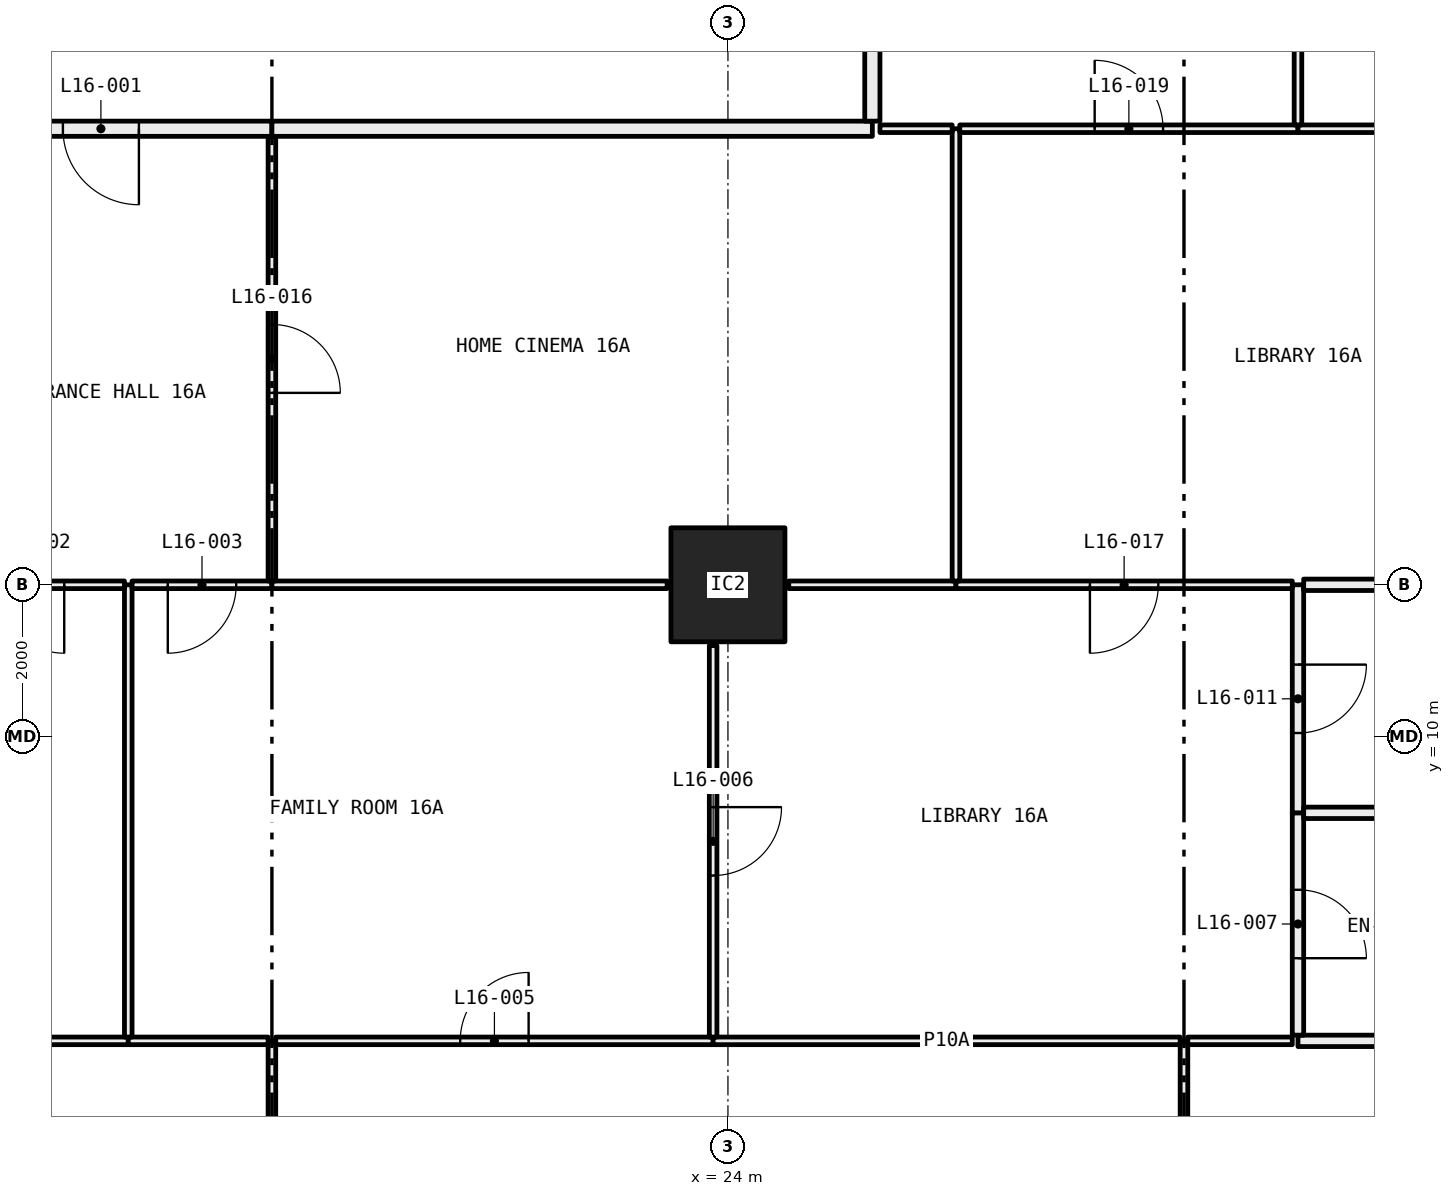
"""IFC4 building model, lengths in metres.
Left out: names, types, materials, properties, quantities, classifications, styles, units other than length and angle.
Written with IfcOpenShell. Run it as: python <this file> out.ifc"""

import sys

from ifc_helpers import new_model, si_unit, direction, frame, frame_2d, origin, origin_2d, place, context, subcontext, project, spatial, rectangle, hollow_rectangle, extrude, element, fill, save


model = new_model("IFC4")
c1 = context("Model", 3, precision=1e-05, world=origin(), true_north=direction((0.0, 1.0)))
c2 = subcontext(c1, "Body", "Model", "MODEL_VIEW")
j1 = project(units=[si_unit("LENGTHUNIT", "METRE"), si_unit("PLANEANGLEUNIT", "RADIAN")], contexts=[c1])
p1 = place(None, origin())
s1 = spatial("IfcSite", under=j1, at=p1, CompositionType="ELEMENT")
p2 = place(p1, origin())
s2 = spatial("IfcBuilding", under=s1, at=p2, CompositionType="ELEMENT")
p3 = place(p2, frame((0.0, 0.0, 67.95)))
s3 = spatial("IfcBuildingStorey", under=s2, at=p3, CompositionType="ELEMENT", Elevation=67.95)
p4 = place(p3, frame((24.0, 12.0, 0.0), z_axis=(0.0, 0.0, 1.0), x_axis=(1.0, 0.0, 0.0)))
e1 = element("IfcColumn", 1, at=p4, inside=s3, PredefinedType="COLUMN", context=c2, shape_type="SweptSolid", body=[
    extrude(hollow_rectangle(XDim=1.5, YDim=1.5, WallThickness=0.065, at=origin_2d()), origin(), (0.0, 0.0, 1.0), 3.05),
])
p5 = place(p3, frame((18.0, 0.72, 0.0), z_axis=(0.0, 0.0, 1.0), x_axis=(0.0, 1.0, 0.0)))
e2 = element("IfcWall", 2, at=p5, inside=s3, PredefinedType="PARTITIONING", context=c2, shape_type="SweptSolid", body=[
    extrude(rectangle(XDim=5.28, YDim=0.1, at=frame_2d((2.64, 0.0))), origin(), (0.0, 0.0, 1.0), 3.05),
])
p6 = place(p5, frame((2.19, 0.0, 0.0)))
e3 = element("IfcOpeningElement", 3, at=p6, cuts=e2, PredefinedType="OPENING", context=c2, shape_type="SweptSolid", body=[
    extrude(rectangle(XDim=0.9, YDim=2.1, at=frame_2d((0.45, 1.05))), frame((0.0, 0.06, 0.0), z_axis=(0.0, -1.0, 0.0), x_axis=(1.0, 0.0, 0.0)), (0.0, 0.0, 1.0), 0.12),
])
p7 = place(p3, frame((16.11, 6.0, 0.0), z_axis=(0.0, 0.0, 1.0), x_axis=(-1.0, 0.0, 0.0)))
e4 = element("IfcWall", 4, at=p7, inside=s3, PredefinedType="PARTITIONING", context=c2, shape_type="SweptSolid", body=[
    extrude(rectangle(XDim=4.06, YDim=0.1, at=frame_2d((2.03, 0.0))), origin(), (0.0, 0.0, 1.0), 2.45),
])
p8 = place(p3, frame((17.95, 6.0, 0.0), z_axis=(0.0, 0.0, 1.0), x_axis=(-1.0, 0.0, 0.0)))
e5 = element("IfcWall", 5, at=p8, inside=s3, PredefinedType="PARTITIONING", context=c2, shape_type="SweptSolid", body=[
    extrude(rectangle(XDim=1.84, YDim=0.1, at=frame_2d((0.92, 0.0))), origin(), (0.0, 0.0, 1.0), 3.05),
])
p9 = place(p3, frame((30.0, 0.72, 0.0), z_axis=(0.0, 0.0, 1.0), x_axis=(0.0, 1.0, 0.0)))
e6 = element("IfcWall", 6, at=p9, inside=s3, PredefinedType="PARTITIONING", context=c2, shape_type="SweptSolid", body=[
    extrude(rectangle(XDim=5.28, YDim=0.1, at=frame_2d((2.64, 0.0))), origin(), (0.0, 0.0, 1.0), 3.05),
])
p10 = place(p9, frame((2.19, 0.0, 0.0)))
e7 = element("IfcOpeningElement", 7, at=p10, cuts=e6, PredefinedType="OPENING", context=c2, shape_type="SweptSolid", body=[
    extrude(rectangle(XDim=0.9, YDim=2.1, at=frame_2d((0.45, 1.05))), frame((0.0, 0.06, 0.0), z_axis=(0.0, -1.0, 0.0), x_axis=(1.0, 0.0, 0.0)), (0.0, 0.0, 1.0), 0.12),
])
p11 = place(p3, frame((23.805, 6.0, 0.0), z_axis=(0.0, 0.0, 1.0), x_axis=(-1.0, 0.0, 0.0)))
e8 = element("IfcWall", 8, at=p11, inside=s3, PredefinedType="PARTITIONING", context=c2, shape_type="SweptSolid", body=[
    extrude(rectangle(XDim=5.755, YDim=0.1, at=frame_2d((2.877, 0.0))), origin(), (0.0, 0.0, 1.0), 3.05),
])
p12 = place(p11, frame((2.427, 0.0, 0.0)))
e9 = element("IfcOpeningElement", 9, at=p12, cuts=e8, PredefinedType="OPENING", context=c2, shape_type="SweptSolid", body=[
    extrude(rectangle(XDim=0.9, YDim=2.1, at=frame_2d((0.45, 1.05))), frame((0.0, 0.06, 0.0), z_axis=(0.0, -1.0, 0.0), x_axis=(1.0, 0.0, 0.0)), (0.0, 0.0, 1.0), 0.12),
])
p13 = place(p3, frame((29.95, 6.0, 0.0), z_axis=(0.0, 0.0, 1.0), x_axis=(-1.0, 0.0, 0.0)))
e10 = element("IfcWall", 10, at=p13, inside=s3, PredefinedType="PARTITIONING", context=c2, shape_type="SweptSolid", body=[
    extrude(rectangle(XDim=6.145, YDim=0.1, at=frame_2d((3.073, 0.0))), origin(), (0.0, 0.0, 1.0), 2.45),
])
p14 = place(p3, frame((31.425, 6.0, 0.0), z_axis=(0.0, 0.0, 1.0), x_axis=(-1.0, 0.0, 0.0)))
e11 = element("IfcWall", 11, at=p14, inside=s3, PredefinedType="PARTITIONING", context=c2, shape_type="SweptSolid", body=[
    extrude(rectangle(XDim=1.375, YDim=0.1, at=frame_2d((0.688, 0.0))), origin(), (0.0, 0.0, 1.0), 3.05),
])
p15 = place(p3, frame((35.9, 6.0, 0.0), z_axis=(0.0, 0.0, 1.0), x_axis=(-1.0, 0.0, 0.0)))
e12 = element("IfcWall", 12, at=p15, inside=s3, PredefinedType="PARTITIONING", context=c2, shape_type="SweptSolid", body=[
    extrude(rectangle(XDim=4.4, YDim=0.15, at=frame_2d((2.2, 0.0))), origin(), (0.0, 0.0, 1.0), 3.05),
])
p16 = place(p3, frame((16.11, 6.05, 0.0), z_axis=(0.0, 0.0, 1.0), x_axis=(0.0, 1.0, 0.0)))
e13 = element("IfcWall", 13, at=p16, inside=s3, PredefinedType="PARTITIONING", context=c2, shape_type="SweptSolid", body=[
    extrude(rectangle(XDim=5.95, YDim=0.1, at=frame_2d((2.975, 0.0))), origin(), (0.0, 0.0, 1.0), 2.45),
])
p17 = place(p3, frame((16.06, 12.0, 0.0), z_axis=(0.0, 0.0, 1.0), x_axis=(-1.0, 0.0, 0.0)))
e14 = element("IfcWall", 14, at=p17, inside=s3, PredefinedType="PARTITIONING", context=c2, shape_type="SweptSolid", body=[
    extrude(rectangle(XDim=2.485, YDim=0.1, at=frame_2d((1.243, 0.0))), origin(), (0.0, 0.0, 1.0), 2.45),
])
p18 = place(p17, frame((0.792, 0.0, 0.0)))
e15 = element("IfcOpeningElement", 15, at=p18, cuts=e14, PredefinedType="OPENING", context=c2, shape_type="SweptSolid", body=[
    extrude(rectangle(XDim=0.9, YDim=2.1, at=frame_2d((0.45, 1.05))), frame((0.0, 0.06, 0.0), z_axis=(0.0, -1.0, 0.0), x_axis=(1.0, 0.0, 0.0)), (0.0, 0.0, 1.0), 0.12),
])
p19 = place(p3, frame((23.805, 6.05, 0.0), z_axis=(0.0, 0.0, 1.0), x_axis=(0.0, 1.0, 0.0)))
e16 = element("IfcWall", 16, at=p19, inside=s3, PredefinedType="PARTITIONING", context=c2, shape_type="SweptSolid", body=[
    extrude(rectangle(XDim=5.15, YDim=0.1, at=frame_2d((2.575, 0.0))), origin(), (0.0, 0.0, 1.0), 3.05),
])
p20 = place(p19, frame((2.125, 0.0, 0.0)))
e17 = element("IfcOpeningElement", 17, at=p20, cuts=e16, PredefinedType="OPENING", context=c2, shape_type="SweptSolid", body=[
    extrude(rectangle(XDim=0.9, YDim=2.1, at=frame_2d((0.45, 1.05))), frame((0.0, 0.06, 0.0), z_axis=(0.0, -1.0, 0.0), x_axis=(1.0, 0.0, 0.0)), (0.0, 0.0, 1.0), 0.12),
])
p21 = place(p3, frame((18.0, 12.0, 0.0), z_axis=(0.0, 0.0, 1.0), x_axis=(-1.0, 0.0, 0.0)))
e18 = element("IfcWall", 18, at=p21, inside=s3, PredefinedType="PARTITIONING", context=c2, shape_type="SweptSolid", body=[
    extrude(rectangle(XDim=1.84, YDim=0.1, at=frame_2d((0.92, 0.0))), origin(), (0.0, 0.0, 1.0), 2.45),
])
p22 = place(p21, frame((0.47, 0.0, 0.0)))
e19 = element("IfcOpeningElement", 19, at=p22, cuts=e18, PredefinedType="OPENING", context=c2, shape_type="SweptSolid", body=[
    extrude(rectangle(XDim=0.9, YDim=2.1, at=frame_2d((0.45, 1.05))), frame((0.0, 0.06, 0.0), z_axis=(0.0, -1.0, 0.0), x_axis=(1.0, 0.0, 0.0)), (0.0, 0.0, 1.0), 0.12),
])
p23 = place(p3, frame((23.2, 12.0, 0.0), z_axis=(0.0, 0.0, 1.0), x_axis=(-1.0, 0.0, 0.0)))
e20 = element("IfcWall", 20, at=p23, inside=s3, PredefinedType="PARTITIONING", context=c2, shape_type="SweptSolid", body=[
    extrude(rectangle(XDim=5.2, YDim=0.1, at=frame_2d((2.6, 0.0))), origin(), (0.0, 0.0, 1.0), 2.45),
])
p24 = place(p3, frame((31.5, 6.075, 0.0), z_axis=(0.0, 0.0, 1.0), x_axis=(0.0, 1.0, 0.0)))
e21 = element("IfcWall", 21, at=p24, inside=s3, PredefinedType="PARTITIONING", context=c2, shape_type="SweptSolid", body=[
    extrude(rectangle(XDim=2.925, YDim=0.15, at=frame_2d((1.462, 0.0))), origin(), (0.0, 0.0, 1.0), 3.05),
])
p25 = place(p24, frame((1.012, 0.0, 0.0)))
e22 = element("IfcOpeningElement", 22, at=p25, cuts=e21, PredefinedType="OPENING", context=c2, shape_type="SweptSolid", body=[
    extrude(rectangle(XDim=0.9, YDim=2.1, at=frame_2d((0.45, 1.05))), frame((0.0, 0.085, 0.0), z_axis=(0.0, -1.0, 0.0), x_axis=(1.0, 0.0, 0.0)), (0.0, 0.0, 1.0), 0.17),
])
p26 = place(p3, frame((31.5, 9.0, 0.0), z_axis=(0.0, 0.0, 1.0), x_axis=(0.0, 1.0, 0.0)))
e23 = element("IfcWall", 23, at=p26, inside=s3, PredefinedType="PARTITIONING", context=c2, shape_type="SweptSolid", body=[
    extrude(rectangle(XDim=3.0, YDim=0.15, at=frame_2d((1.5, 0.0))), origin(), (0.0, 0.0, 1.0), 2.45),
])
p27 = place(p26, frame((1.05, 0.0, 0.0)))
e24 = element("IfcOpeningElement", 24, at=p27, cuts=e23, PredefinedType="OPENING", context=c2, shape_type="SweptSolid", body=[
    extrude(rectangle(XDim=0.9, YDim=2.1, at=frame_2d((0.45, 1.05))), frame((0.0, 0.085, 0.0), z_axis=(0.0, -1.0, 0.0), x_axis=(1.0, 0.0, 0.0)), (0.0, 0.0, 1.0), 0.17),
])
p28 = place(p3, frame((27.0, 12.0, 0.0), z_axis=(0.0, 0.0, 1.0), x_axis=(-1.0, 0.0, 0.0)))
e25 = element("IfcWall", 25, at=p28, inside=s3, PredefinedType="PARTITIONING", context=c2, shape_type="SweptSolid", body=[
    extrude(rectangle(XDim=2.2, YDim=0.1, at=frame_2d((1.1, 0.0))), origin(), (0.0, 0.0, 1.0), 2.45),
])
p29 = place(p3, frame((31.425, 12.0, 0.0), z_axis=(0.0, 0.0, 1.0), x_axis=(-1.0, 0.0, 0.0)))
e26 = element("IfcWall", 26, at=p29, inside=s3, PredefinedType="PARTITIONING", context=c2, shape_type="SweptSolid", body=[
    extrude(rectangle(XDim=4.425, YDim=0.1, at=frame_2d((2.212, 0.0))), origin(), (0.0, 0.0, 1.0), 2.45),
])
p30 = place(p29, frame((1.762, 0.0, 0.0)))
e27 = element("IfcOpeningElement", 27, at=p30, cuts=e26, PredefinedType="OPENING", context=c2, shape_type="SweptSolid", body=[
    extrude(rectangle(XDim=0.9, YDim=2.1, at=frame_2d((0.45, 1.05))), frame((0.0, 0.06, 0.0), z_axis=(0.0, -1.0, 0.0), x_axis=(1.0, 0.0, 0.0)), (0.0, 0.0, 1.0), 0.12),
])
p31 = place(p3, frame((35.9, 9.0, 0.0), z_axis=(0.0, 0.0, 1.0), x_axis=(-1.0, 0.0, 0.0)))
e28 = element("IfcWall", 28, at=p31, inside=s3, PredefinedType="PARTITIONING", context=c2, shape_type="SweptSolid", body=[
    extrude(rectangle(XDim=4.325, YDim=0.15, at=frame_2d((2.163, 0.0))), origin(), (0.0, 0.0, 1.0), 3.05),
])
p32 = place(p3, frame((35.2, 12.0, 0.0), z_axis=(0.0, 0.0, 1.0), x_axis=(-1.0, 0.0, 0.0)))
e29 = element("IfcWall", 29, at=p32, inside=s3, PredefinedType="PARTITIONING", context=c2, shape_type="SweptSolid", body=[
    extrude(rectangle(XDim=3.625, YDim=0.15, at=frame_2d((1.812, 0.0))), origin(), (0.0, 0.0, 1.0), 2.45),
])
p33 = place(p3, frame((18.0, 12.05, 0.0), z_axis=(0.0, 0.0, 1.0), x_axis=(0.0, 1.0, 0.0)))
e30 = element("IfcWall", 30, at=p33, inside=s3, PredefinedType="PARTITIONING", context=c2, shape_type="SweptSolid", body=[
    extrude(rectangle(XDim=5.85, YDim=0.1, at=frame_2d((2.925, 0.0))), origin(), (0.0, 0.0, 1.0), 2.45),
])
p34 = place(p33, frame((2.475, 0.0, 0.0)))
e31 = element("IfcOpeningElement", 31, at=p34, cuts=e30, PredefinedType="OPENING", context=c2, shape_type="SweptSolid", body=[
    extrude(rectangle(XDim=0.9, YDim=2.1, at=frame_2d((0.45, 1.05))), frame((0.0, 0.06, 0.0), z_axis=(0.0, -1.0, 0.0), x_axis=(1.0, 0.0, 0.0)), (0.0, 0.0, 1.0), 0.12),
])
p35 = place(p3, frame((18.0, 18.0, 0.0), z_axis=(0.0, 0.0, 1.0), x_axis=(-1.0, 0.0, 0.0)))
e32 = element("IfcWall", 32, at=p35, inside=s3, PredefinedType="PARTITIONING", context=c2, shape_type="SweptSolid", body=[
    extrude(rectangle(XDim=4.5, YDim=0.2, at=frame_2d((2.25, 0.0))), origin(), (0.0, 0.0, 1.0), 3.05),
])
p36 = place(p35, frame((1.75, 0.0, 0.0)))
e33 = element("IfcOpeningElement", 33, at=p36, cuts=e32, PredefinedType="OPENING", context=c2, shape_type="SweptSolid", body=[
    extrude(rectangle(XDim=1.0, YDim=2.1, at=frame_2d((0.5, 1.05))), frame((0.0, 0.11, 0.0), z_axis=(0.0, -1.0, 0.0), x_axis=(1.0, 0.0, 0.0)), (0.0, 0.0, 1.0), 0.22),
])
p37 = place(p3, frame((27.0, 12.05, 0.0), z_axis=(0.0, 0.0, 1.0), x_axis=(0.0, 1.0, 0.0)))
e34 = element("IfcWall", 34, at=p37, inside=s3, PredefinedType="PARTITIONING", context=c2, shape_type="SweptSolid", body=[
    extrude(rectangle(XDim=5.95, YDim=0.1, at=frame_2d((2.975, 0.0))), origin(), (0.0, 0.0, 1.0), 2.45),
])
p38 = place(p3, frame((26.95, 18.0, 0.0), z_axis=(0.0, 0.0, 1.0), x_axis=(-1.0, 0.0, 0.0)))
e35 = element("IfcWall", 35, at=p38, inside=s3, PredefinedType="PARTITIONING", context=c2, shape_type="SweptSolid", body=[
    extrude(rectangle(XDim=0.95, YDim=0.1, at=frame_2d((0.475, 0.0))), origin(), (0.0, 0.0, 1.0), 3.05),
])
p39 = place(p3, frame((25.9, 18.0, 0.0), z_axis=(0.0, 0.0, 1.0), x_axis=(-1.0, 0.0, 0.0)))
e36 = element("IfcWall", 36, at=p39, inside=s3, PredefinedType="PARTITIONING", context=c2, shape_type="SweptSolid", body=[
    extrude(rectangle(XDim=7.9, YDim=0.2, at=frame_2d((3.95, 0.0))), origin(), (0.0, 0.0, 1.0), 3.05),
])
p40 = place(p3, frame((31.5, 18.0, 0.0), z_axis=(0.0, 0.0, 1.0), x_axis=(-1.0, 0.0, 0.0)))
e37 = element("IfcWall", 37, at=p40, inside=s3, PredefinedType="PARTITIONING", context=c2, shape_type="SweptSolid", body=[
    extrude(rectangle(XDim=4.45, YDim=0.1, at=frame_2d((2.225, 0.0))), origin(), (0.0, 0.0, 1.0), 3.05),
])
p41 = place(p40, frame((1.775, 0.0, 0.0)))
e38 = element("IfcOpeningElement", 38, at=p41, cuts=e37, PredefinedType="OPENING", context=c2, shape_type="SweptSolid", body=[
    extrude(rectangle(XDim=0.9, YDim=2.1, at=frame_2d((0.45, 1.05))), frame((0.0, 0.06, 0.0), z_axis=(0.0, -1.0, 0.0), x_axis=(1.0, 0.0, 0.0)), (0.0, 0.0, 1.0), 0.12),
])
p42 = place(p3, frame((35.9, 18.0, 0.0), z_axis=(0.0, 0.0, 1.0), x_axis=(-1.0, 0.0, 0.0)))
e39 = element("IfcWall", 39, at=p42, inside=s3, PredefinedType="PARTITIONING", context=c2, shape_type="SweptSolid", body=[
    extrude(rectangle(XDim=4.4, YDim=0.1, at=frame_2d((2.2, 0.0))), origin(), (0.0, 0.0, 1.0), 3.05),
])
p43 = place(p3, frame((31.5, 18.05, 0.0), z_axis=(0.0, 0.0, 1.0), x_axis=(0.0, 1.0, 0.0)))
e40 = element("IfcWall", 40, at=p43, inside=s3, PredefinedType="PARTITIONING", context=c2, shape_type="SweptSolid", body=[
    extrude(rectangle(XDim=6.25, YDim=0.1, at=frame_2d((3.125, 0.0))), origin(), (0.0, 0.0, 1.0), 2.45),
])
p44 = place(p43, frame((2.675, 0.0, 0.0)))
e41 = element("IfcOpeningElement", 41, at=p44, cuts=e40, PredefinedType="OPENING", context=c2, shape_type="SweptSolid", body=[
    extrude(rectangle(XDim=0.9, YDim=2.1, at=frame_2d((0.45, 1.05))), frame((0.0, 0.06, 0.0), z_axis=(0.0, -1.0, 0.0), x_axis=(1.0, 0.0, 0.0)), (0.0, 0.0, 1.0), 0.12),
])
p45 = place(p3, frame((25.9, 23.9, 0.0), z_axis=(0.0, 0.0, 1.0), x_axis=(0.0, -1.0, 0.0)))
e42 = element("IfcWall", 42, at=p45, inside=s3, PredefinedType="PARTITIONING", context=c2, shape_type="SweptSolid", body=[
    extrude(rectangle(XDim=5.8, YDim=0.2, at=frame_2d((2.9, 0.0))), origin(), (0.0, 0.0, 1.0), 3.05),
])
p46 = place(p36, origin())
e43 = element("IfcDoor", 43, at=p46, inside=s3, OperationType="SINGLE_SWING_RIGHT", PredefinedType="DOOR", context=c2, shape_type="SweptSolid", body=[
    extrude(rectangle(XDim=1.0, YDim=2.1, at=frame_2d((0.5, 1.05))), frame((0.0, 0.025, 0.0), z_axis=(0.0, -1.0, 0.0), x_axis=(1.0, 0.0, 0.0)), (0.0, 0.0, 1.0), 0.05),
])
fill(e33, e43)
p47 = place(p18, origin())
e44 = element("IfcDoor", 44, at=p47, inside=s3, OperationType="SINGLE_SWING_RIGHT", PredefinedType="DOOR", context=c2, shape_type="SweptSolid", body=[
    extrude(rectangle(XDim=0.9, YDim=2.1, at=frame_2d((0.45, 1.05))), frame((0.0, 0.025, 0.0), z_axis=(0.0, -1.0, 0.0), x_axis=(1.0, 0.0, 0.0)), (0.0, 0.0, 1.0), 0.05),
])
fill(e15, e44)
p48 = place(p22, origin())
e45 = element("IfcDoor", 45, at=p48, inside=s3, OperationType="SINGLE_SWING_LEFT", PredefinedType="DOOR", context=c2, shape_type="SweptSolid", body=[
    extrude(rectangle(XDim=0.9, YDim=2.1, at=frame_2d((0.45, 1.05))), frame((0.0, 0.025, 0.0), z_axis=(0.0, -1.0, 0.0), x_axis=(1.0, 0.0, 0.0)), (0.0, 0.0, 1.0), 0.05),
])
fill(e19, e45)
p49 = place(p12, frame((0.9, 0.0, 0.0), x_axis=(-1.0, 0.0, 0.0)))
e46 = element("IfcDoor", 46, at=p49, inside=s3, OperationType="SINGLE_SWING_LEFT", PredefinedType="DOOR", context=c2, shape_type="SweptSolid", body=[
    extrude(rectangle(XDim=0.9, YDim=2.1, at=frame_2d((0.45, 1.05))), frame((0.0, 0.025, 0.0), z_axis=(0.0, -1.0, 0.0), x_axis=(1.0, 0.0, 0.0)), (0.0, 0.0, 1.0), 0.05),
])
fill(e9, e46)
p50 = place(p20, frame((0.9, 0.0, 0.0), x_axis=(-1.0, 0.0, 0.0)))
e47 = element("IfcDoor", 47, at=p50, inside=s3, OperationType="SINGLE_SWING_RIGHT", PredefinedType="DOOR", context=c2, shape_type="SweptSolid", body=[
    extrude(rectangle(XDim=0.9, YDim=2.1, at=frame_2d((0.45, 1.05))), frame((0.0, 0.025, 0.0), z_axis=(0.0, -1.0, 0.0), x_axis=(1.0, 0.0, 0.0)), (0.0, 0.0, 1.0), 0.05),
])
fill(e17, e47)
p51 = place(p25, frame((0.9, 0.0, 0.0), x_axis=(-1.0, 0.0, 0.0)))
e48 = element("IfcDoor", 48, at=p51, inside=s3, OperationType="SINGLE_SWING_LEFT", PredefinedType="DOOR", context=c2, shape_type="SweptSolid", body=[
    extrude(rectangle(XDim=0.9, YDim=2.1, at=frame_2d((0.45, 1.05))), frame((0.0, 0.025, 0.0), z_axis=(0.0, -1.0, 0.0), x_axis=(1.0, 0.0, 0.0)), (0.0, 0.0, 1.0), 0.05),
])
fill(e22, e48)
p52 = place(p27, frame((0.9, 0.0, 0.0), x_axis=(-1.0, 0.0, 0.0)))
e49 = element("IfcDoor", 49, at=p52, inside=s3, OperationType="SINGLE_SWING_RIGHT", PredefinedType="DOOR", context=c2, shape_type="SweptSolid", body=[
    extrude(rectangle(XDim=0.9, YDim=2.1, at=frame_2d((0.45, 1.05))), frame((0.0, 0.025, 0.0), z_axis=(0.0, -1.0, 0.0), x_axis=(1.0, 0.0, 0.0)), (0.0, 0.0, 1.0), 0.05),
])
fill(e24, e49)
p53 = place(p34, frame((0.9, 0.0, 0.0), x_axis=(-1.0, 0.0, 0.0)))
e50 = element("IfcDoor", 50, at=p53, inside=s3, OperationType="SINGLE_SWING_LEFT", PredefinedType="DOOR", context=c2, shape_type="SweptSolid", body=[
    extrude(rectangle(XDim=0.9, YDim=2.1, at=frame_2d((0.45, 1.05))), frame((0.0, 0.025, 0.0), z_axis=(0.0, -1.0, 0.0), x_axis=(1.0, 0.0, 0.0)), (0.0, 0.0, 1.0), 0.05),
])
fill(e31, e50)
p54 = place(p30, origin())
e51 = element("IfcDoor", 51, at=p54, inside=s3, OperationType="SINGLE_SWING_LEFT", PredefinedType="DOOR", context=c2, shape_type="SweptSolid", body=[
    extrude(rectangle(XDim=0.9, YDim=2.1, at=frame_2d((0.45, 1.05))), frame((0.0, 0.025, 0.0), z_axis=(0.0, -1.0, 0.0), x_axis=(1.0, 0.0, 0.0)), (0.0, 0.0, 1.0), 0.05),
])
fill(e27, e51)
p55 = place(p41, frame((0.9, 0.0, 0.0), x_axis=(-1.0, 0.0, 0.0)))
e52 = element("IfcDoor", 52, at=p55, inside=s3, OperationType="SINGLE_SWING_RIGHT", PredefinedType="DOOR", context=c2, shape_type="SweptSolid", body=[
    extrude(rectangle(XDim=0.9, YDim=2.1, at=frame_2d((0.45, 1.05))), frame((0.0, 0.025, 0.0), z_axis=(0.0, -1.0, 0.0), x_axis=(1.0, 0.0, 0.0)), (0.0, 0.0, 1.0), 0.05),
])
fill(e38, e52)
save(model, sys.argv[1])
